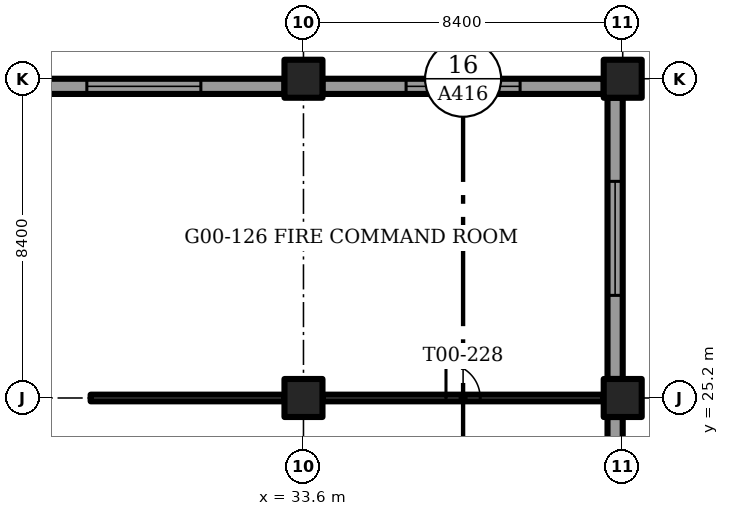
"""IFC4 building model, lengths in metres.
Left out: names, types, materials, properties, quantities, classifications, styles, units other than length and angle.
Written with IfcOpenShell. Run it as: python <this file> out.ifc"""

import sys

from ifc_helpers import new_model, si_unit, direction, frame, frame_2d, origin, origin_2d, place, context, subcontext, project, spatial, rectangle, extrude, element, fill, save


model = new_model("IFC4")
c1 = context("Model", 3, precision=1e-05, world=origin(), true_north=direction((0.0, 1.0)))
c2 = subcontext(c1, "Body", "Model", "MODEL_VIEW")
j1 = project(units=[si_unit("LENGTHUNIT", "METRE"), si_unit("PLANEANGLEUNIT", "RADIAN")], contexts=[c1])
p1 = place(None, origin())
s1 = spatial("IfcSite", under=j1, at=p1, CompositionType="ELEMENT")
p2 = place(p1, origin())
s2 = spatial("IfcBuilding", under=s1, at=p2, CompositionType="ELEMENT")
p3 = place(p2, origin())
s3 = spatial("IfcBuildingStorey", under=s2, at=p3, CompositionType="ELEMENT", Elevation=0.0)
for number, where, z_axis, x_axis in (
    (1, (33.6, 25.2, -0.35), (0.0, 0.0, 1.0), (1.0, 0.0, 0.0)),
    (2, (33.6, 33.6, -0.35), (0.0, 0.0, 1.0), (1.0, 0.0, 0.0)),
    (3, (42.0, 25.2, -0.35), (0.0, 0.0, 1.0), (1.0, 0.0, 0.0)),
    (4, (42.0, 33.6, -0.35), (0.0, 0.0, 1.0), (1.0, 0.0, 0.0)),
):
    element("IfcColumn", number, at=place(p3, frame(where, z_axis=z_axis, x_axis=x_axis)), inside=s3, PredefinedType="COLUMN", context=c2, shape_type="SweptSolid", body=[
        extrude(rectangle(XDim=1.0, YDim=1.0, at=origin_2d()), origin(), (0.0, 0.0, 1.0), 6.0),
    ])
p4 = place(p3, frame((41.8, 33.1, 0.0), z_axis=(0.0, 0.0, 1.0), x_axis=(0.0, -1.0, 0.0)))
e5 = element("IfcWall", 5, at=p4, inside=s3, PredefinedType="SOLIDWALL", context=c2, shape_type="SweptSolid", body=[
    extrude(rectangle(XDim=7.4, YDim=0.4, at=frame_2d((3.7, 0.0))), origin(), (0.0, 0.0, 1.0), 5.65),
])
p5 = place(p4, frame((2.2, 0.0, 1.0)))
e6 = element("IfcOpeningElement", 6, at=p5, cuts=e5, PredefinedType="OPENING", context=c2, shape_type="SweptSolid", body=[
    extrude(rectangle(XDim=3.0, YDim=2.2, at=frame_2d((1.5, 1.1))), frame((0.0, 0.2, 0.0), z_axis=(0.0, -1.0, 0.0), x_axis=(1.0, 0.0, 0.0)), (0.0, 0.0, 1.0), 0.4),
])
p6 = place(p3, frame((41.8, 24.7, 0.0), z_axis=(0.0, 0.0, 1.0), x_axis=(0.0, -1.0, 0.0)))
e7 = element("IfcWall", 7, at=p6, inside=s3, PredefinedType="SOLIDWALL", context=c2, shape_type="SweptSolid", body=[
    extrude(rectangle(XDim=7.4, YDim=0.4, at=frame_2d((3.7, 0.0))), origin(), (0.0, 0.0, 1.0), 5.65),
])
p7 = place(p6, frame((2.8, 0.0, 0.0)))
e8 = element("IfcOpeningElement", 8, at=p7, cuts=e7, PredefinedType="OPENING", context=c2, shape_type="SweptSolid", body=[
    extrude(rectangle(XDim=1.8, YDim=2.4, at=frame_2d((0.9, 1.2))), frame((0.0, 0.2, 0.0), z_axis=(0.0, -1.0, 0.0), x_axis=(1.0, 0.0, 0.0)), (0.0, 0.0, 1.0), 0.4),
])
p8 = place(p3, frame((25.7, 33.4, 0.0), z_axis=(0.0, 0.0, 1.0), x_axis=(1.0, 0.0, 0.0)))
e9 = element("IfcWall", 9, at=p8, inside=s3, PredefinedType="SOLIDWALL", context=c2, shape_type="SweptSolid", body=[
    extrude(rectangle(XDim=7.4, YDim=0.4, at=frame_2d((3.7, 0.0))), origin(), (0.0, 0.0, 1.0), 5.65),
])
p9 = place(p8, frame((2.2, 0.0, 1.0)))
e10 = element("IfcOpeningElement", 10, at=p9, cuts=e9, PredefinedType="OPENING", context=c2, shape_type="SweptSolid", body=[
    extrude(rectangle(XDim=3.0, YDim=2.2, at=frame_2d((1.5, 1.1))), frame((0.0, 0.2, 0.0), z_axis=(0.0, -1.0, 0.0), x_axis=(1.0, 0.0, 0.0)), (0.0, 0.0, 1.0), 0.4),
])
p10 = place(p3, frame((34.1, 33.4, 0.0), z_axis=(0.0, 0.0, 1.0), x_axis=(1.0, 0.0, 0.0)))
e11 = element("IfcWall", 11, at=p10, inside=s3, PredefinedType="SOLIDWALL", context=c2, shape_type="SweptSolid", body=[
    extrude(rectangle(XDim=7.4, YDim=0.4, at=frame_2d((3.7, 0.0))), origin(), (0.0, 0.0, 1.0), 5.65),
])
p11 = place(p10, frame((2.2, 0.0, 1.0)))
e12 = element("IfcOpeningElement", 12, at=p11, cuts=e11, PredefinedType="OPENING", context=c2, shape_type="SweptSolid", body=[
    extrude(rectangle(XDim=3.0, YDim=2.2, at=frame_2d((1.5, 1.1))), frame((0.0, 0.2, 0.0), z_axis=(0.0, -1.0, 0.0), x_axis=(1.0, 0.0, 0.0)), (0.0, 0.0, 1.0), 0.4),
])
p12 = place(p3, frame((28.0, 25.2, 0.0), z_axis=(0.0, 0.0, 1.0), x_axis=(1.0, 0.0, 0.0)))
e13 = element("IfcWall", 13, at=p12, inside=s3, PredefinedType="PARTITIONING", context=c2, shape_type="SweptSolid", body=[
    extrude(rectangle(XDim=5.1, YDim=0.175, at=frame_2d((2.55, 0.0))), origin(), (0.0, 0.0, 1.0), 5.65),
])
p13 = place(p3, frame((34.1, 25.2, 0.0), z_axis=(0.0, 0.0, 1.0), x_axis=(1.0, 0.0, 0.0)))
e14 = element("IfcWall", 14, at=p13, inside=s3, PredefinedType="PARTITIONING", context=c2, shape_type="SweptSolid", body=[
    extrude(rectangle(XDim=7.4, YDim=0.175, at=frame_2d((3.7, 0.0))), origin(), (0.0, 0.0, 1.0), 5.65),
])
p14 = place(p13, frame((3.25, 0.0, 0.0)))
e15 = element("IfcOpeningElement", 15, at=p14, cuts=e14, PredefinedType="OPENING", context=c2, shape_type="SweptSolid", body=[
    extrude(rectangle(XDim=0.9, YDim=2.1, at=frame_2d((0.45, 1.05))), frame((0.0, 0.087, 0.0), z_axis=(0.0, -1.0, 0.0), x_axis=(1.0, 0.0, 0.0)), (0.0, 0.0, 1.0), 0.175),
])
p15 = place(p5, origin())
e16 = element("IfcWindow", 16, at=p15, inside=s3, PartitioningType="SINGLE_PANEL", PredefinedType="WINDOW", context=c2, shape_type="SweptSolid", body=[
    extrude(rectangle(XDim=3.0, YDim=2.2, at=frame_2d((1.5, 1.1))), frame((0.0, 0.03, 0.0), z_axis=(0.0, -1.0, 0.0), x_axis=(1.0, 0.0, 0.0)), (0.0, 0.0, 1.0), 0.06),
])
fill(e6, e16)
p16 = place(p9, origin())
e17 = element("IfcWindow", 17, at=p16, inside=s3, PartitioningType="SINGLE_PANEL", PredefinedType="WINDOW", context=c2, shape_type="SweptSolid", body=[
    extrude(rectangle(XDim=3.0, YDim=2.2, at=frame_2d((1.5, 1.1))), frame((0.0, 0.03, 0.0), z_axis=(0.0, -1.0, 0.0), x_axis=(1.0, 0.0, 0.0)), (0.0, 0.0, 1.0), 0.06),
])
fill(e10, e17)
p17 = place(p11, origin())
e18 = element("IfcWindow", 18, at=p17, inside=s3, PartitioningType="SINGLE_PANEL", PredefinedType="WINDOW", context=c2, shape_type="SweptSolid", body=[
    extrude(rectangle(XDim=3.0, YDim=2.2, at=frame_2d((1.5, 1.1))), frame((0.0, 0.03, 0.0), z_axis=(0.0, -1.0, 0.0), x_axis=(1.0, 0.0, 0.0)), (0.0, 0.0, 1.0), 0.06),
])
fill(e12, e18)
p18 = place(p14, origin())
e19 = element("IfcDoor", 19, at=p18, inside=s3, OperationType="SINGLE_SWING_RIGHT", PredefinedType="DOOR", context=c2, shape_type="SweptSolid", body=[
    extrude(rectangle(XDim=0.9, YDim=2.1, at=frame_2d((0.45, 1.05))), frame((0.0, 0.025, 0.0), z_axis=(0.0, -1.0, 0.0), x_axis=(1.0, 0.0, 0.0)), (0.0, 0.0, 1.0), 0.05),
])
fill(e15, e19)
save(model, sys.argv[1])
